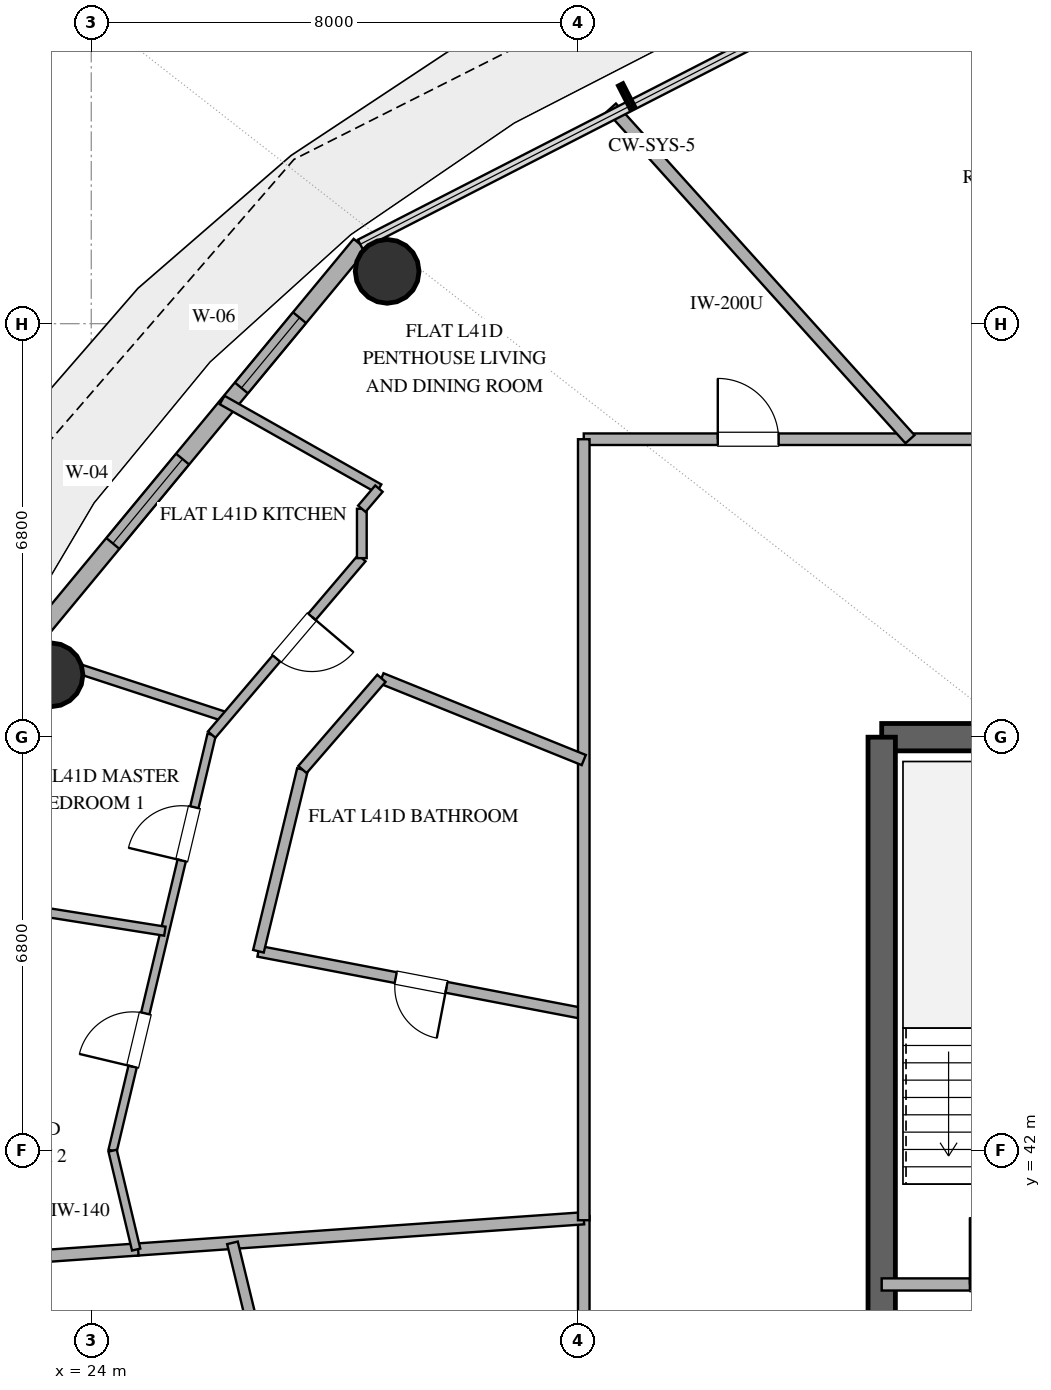
"""IFC4 building model, lengths in metres.
Left out: names, types, materials, properties, quantities, classifications, styles, units other than length and angle.
Written with IfcOpenShell. Run it as: python <this file> out.ifc"""

import sys

from ifc_helpers import new_model, si_unit, direction, frame, frame_2d, origin, origin_2d, place, context, subcontext, project, spatial, rectangle, hollow_circle, extrude, element, fill, save


model = new_model("IFC4")
c1 = context("Model", 3, precision=1e-05, world=origin(), true_north=direction((0.0, 1.0)))
c2 = subcontext(c1, "Body", "Model", "MODEL_VIEW")
j1 = project(units=[si_unit("LENGTHUNIT", "METRE"), si_unit("PLANEANGLEUNIT", "RADIAN")], contexts=[c1])
p1 = place(None, origin())
s1 = spatial("IfcSite", under=j1, at=p1, CompositionType="ELEMENT")
p2 = place(p1, origin())
s2 = spatial("IfcBuilding", under=s1, at=p2, CompositionType="ELEMENT")
p3 = place(p2, frame((0.0, 0.0, 165.0)))
s3 = spatial("IfcBuildingStorey", under=s2, at=p3, CompositionType="ELEMENT", Elevation=165.0)
p4 = place(p3, frame((37.0, 48.8, 0.0), z_axis=(0.0, 0.0, 1.0), x_axis=(1.0, 0.0, 0.0)))
e1 = element("IfcWall", 1, at=p4, inside=s3, PredefinedType="SHEAR", context=c2, shape_type="SweptSolid", body=[
    extrude(rectangle(XDim=4.0, YDim=0.45, at=frame_2d((2.0, 0.0))), origin(), (0.0, 0.0, 1.0), 3.38),
])
p5 = place(p3, frame((37.0, 35.2, 0.0), z_axis=(0.0, 0.0, 1.0), x_axis=(0.0, 1.0, 0.0)))
e2 = element("IfcWall", 2, at=p5, inside=s3, PredefinedType="SHEAR", context=c2, shape_type="SweptSolid", body=[
    extrude(rectangle(XDim=13.6, YDim=0.45, at=frame_2d((6.8, 0.0))), origin(), (0.0, 0.0, 1.0), 3.38),
])
for number, where, z_axis, x_axis in (
    (3, (28.866, 56.46, 0.0), (0.0, 0.0, 1.0), (1.0, 0.0, 0.0)),
    (4, (23.338, 49.826, 0.0), (0.0, 0.0, 1.0), (1.0, 0.0, 0.0)),
):
    element("IfcColumn", number, at=place(p3, frame(where, z_axis=z_axis, x_axis=x_axis)), inside=s3, PredefinedType="COLUMN", context=c2, shape_type="SweptSolid", body=[
        extrude(hollow_circle(Radius=0.525, WallThickness=0.028, at=origin_2d()), origin(), (0.0, 0.0, 1.0), 3.38),
    ])
p6 = place(p3, frame((28.424, 56.906, 0.0), z_axis=(0.0, 0.0, 1.0), x_axis=(-0.637333477683, -0.770588111915, 0.0)))
e5 = element("IfcWall", 5, at=p6, inside=s3, PredefinedType="SOLIDWALL", context=c2, shape_type="SweptSolid", body=[
    extrude(rectangle(XDim=8.875, YDim=0.28, at=frame_2d((4.438, 0.0))), origin(), (0.0, 0.0, 1.0), 3.38),
])
p7 = place(p6, frame((1.566, 0.0, 0.85)))
e6 = element("IfcOpeningElement", 6, at=p7, cuts=e5, PredefinedType="OPENING", context=c2, shape_type="SweptSolid", body=[
    extrude(rectangle(XDim=1.5, YDim=2.0, at=frame_2d((0.75, 1.0))), frame((0.0, 0.15, 0.0), z_axis=(0.0, -1.0, 0.0), x_axis=(1.0, 0.0, 0.0)), (0.0, 0.0, 1.0), 0.3),
])
p8 = place(p6, frame((4.584, 0.0, 0.85)))
e7 = element("IfcOpeningElement", 7, at=p8, cuts=e5, PredefinedType="OPENING", context=c2, shape_type="SweptSolid", body=[
    extrude(rectangle(XDim=1.8, YDim=2.2, at=frame_2d((0.9, 1.1))), frame((0.0, 0.15, 0.0), z_axis=(0.0, -1.0, 0.0), x_axis=(1.0, 0.0, 0.0)), (0.0, 0.0, 1.0), 0.3),
])
p9 = place(p3, frame((37.0, 39.8, 0.0), z_axis=(0.0, 0.0, 1.0), x_axis=(1.0, 0.0, 0.0)))
e8 = element("IfcWall", 8, at=p9, inside=s3, PredefinedType="SOLIDWALL", context=c2, shape_type="SweptSolid", body=[
    extrude(rectangle(XDim=4.0, YDim=0.2, at=frame_2d((2.0, 0.0))), origin(), (0.0, 0.0, 1.0), 2.74),
])
p10 = place(p9, frame((1.45, 0.0, 0.0)))
e9 = element("IfcOpeningElement", 9, at=p10, cuts=e8, PredefinedType="OPENING", context=c2, shape_type="SweptSolid", body=[
    extrude(rectangle(XDim=1.1, YDim=2.15, at=frame_2d((0.55, 1.075))), frame((0.0, 0.11, 0.0), z_axis=(0.0, -1.0, 0.0), x_axis=(1.0, 0.0, 0.0)), (0.0, 0.0, 1.0), 0.22),
])
p11 = place(p3, frame((32.1, 53.7, 0.0), z_axis=(0.0, 0.0, 1.0), x_axis=(1.0, 0.0, 0.0)))
e10 = element("IfcWall", 10, at=p11, inside=s3, PredefinedType="PARTITIONING", context=c2, shape_type="SweptSolid", body=[
    extrude(rectangle(XDim=19.477, YDim=0.19, at=frame_2d((9.738, 0.0))), origin(), (0.0, 0.0, 1.0), 2.74),
])
p12 = place(p11, frame((9.923, 0.0, 0.0)))
e11 = element("IfcOpeningElement", 11, at=p12, cuts=e10, PredefinedType="OPENING", context=c2, shape_type="SweptSolid", body=[
    extrude(rectangle(XDim=1.0, YDim=2.2, at=frame_2d((0.5, 1.1))), frame((0.0, 0.105, 0.0), z_axis=(0.0, -1.0, 0.0), x_axis=(1.0, 0.0, 0.0)), (0.0, 0.0, 1.0), 0.21),
])
p13 = place(p11, frame((2.204, 0.0, 0.0)))
e12 = element("IfcOpeningElement", 12, at=p13, cuts=e10, PredefinedType="OPENING", context=c2, shape_type="SweptSolid", body=[
    extrude(rectangle(XDim=1.0, YDim=2.2, at=frame_2d((0.5, 1.1))), frame((0.0, 0.105, 0.0), z_axis=(0.0, -1.0, 0.0), x_axis=(1.0, 0.0, 0.0)), (0.0, 0.0, 1.0), 0.21),
])
p14 = place(p3, frame((32.1, 30.3, 0.0), z_axis=(0.0, 0.0, 1.0), x_axis=(0.0, 1.0, 0.0)))
e13 = element("IfcWall", 13, at=p14, inside=s3, PredefinedType="PARTITIONING", context=c2, shape_type="SweptSolid", body=[
    extrude(rectangle(XDim=10.62, YDim=0.19, at=frame_2d((5.31, 0.0))), origin(), (0.0, 0.0, 1.0), 2.74),
])
p15 = place(p14, frame((3.475, 0.0, 0.0)))
e14 = element("IfcOpeningElement", 14, at=p15, cuts=e13, PredefinedType="OPENING", context=c2, shape_type="SweptSolid", body=[
    extrude(rectangle(XDim=1.0, YDim=2.2, at=frame_2d((0.5, 1.1))), frame((0.0, 0.105, 0.0), z_axis=(0.0, -1.0, 0.0), x_axis=(1.0, 0.0, 0.0)), (0.0, 0.0, 1.0), 0.21),
])
p16 = place(p3, frame((37.465, 53.7, 0.0), z_axis=(0.0, 0.0, 1.0), x_axis=(-0.669128292476, 0.7431469089, 0.0)))
e15 = element("IfcWall", 15, at=p16, inside=s3, PredefinedType="PARTITIONING", context=c2, shape_type="SweptSolid", body=[
    extrude(rectangle(XDim=7.339, YDim=0.2, at=frame_2d((3.669, 0.0))), origin(), (0.0, 0.0, 1.0), 2.74),
])
p17 = place(p3, frame((32.1, 40.888, 0.0), z_axis=(0.0, 0.0, 1.0), x_axis=(-0.997562906323, -0.069772830877, 0.0)))
e16 = element("IfcWall", 16, at=p17, inside=s3, PredefinedType="PARTITIONING", context=c2, shape_type="SweptSolid", body=[
    extrude(rectangle(XDim=7.38, YDim=0.2, at=frame_2d((3.69, 0.0))), origin(), (0.0, 0.0, 1.0), 2.74),
])
p18 = place(p3, frame((32.1, 44.253, 0.0), z_axis=(0.0, 0.0, 1.0), x_axis=(-0.982102846986, 0.188345421878, 0.0)))
e17 = element("IfcWall", 17, at=p18, inside=s3, PredefinedType="PLUMBINGWALL", context=c2, shape_type="SweptSolid", body=[
    extrude(rectangle(XDim=5.448, YDim=0.18, at=frame_2d((2.724, 0.0))), origin(), (0.0, 0.0, 1.0), 2.74),
])
p19 = place(p18, frame((2.299, 0.0, 0.0)))
e18 = element("IfcOpeningElement", 18, at=p19, cuts=e17, PredefinedType="OPENING", context=c2, shape_type="SweptSolid", body=[
    extrude(rectangle(XDim=0.85, YDim=2.1, at=frame_2d((0.425, 1.05))), frame((0.0, 0.1, 0.0), z_axis=(0.0, -1.0, 0.0), x_axis=(1.0, 0.0, 0.0)), (0.0, 0.0, 1.0), 0.2),
])
p20 = place(p3, frame((32.1, 40.856, 0.0), z_axis=(0.0, 0.0, 1.0), x_axis=(0.0, 1.0, 0.0)))
e19 = element("IfcWall", 19, at=p20, inside=s3, PredefinedType="PARTITIONING", context=c2, shape_type="SweptSolid", body=[
    extrude(rectangle(XDim=12.844, YDim=0.19, at=frame_2d((6.422, 0.0))), origin(), (0.0, 0.0, 1.0), 2.74),
])
p21 = place(p3, frame((26.322, 40.484, 0.0), z_axis=(0.0, 0.0, 1.0), x_axis=(0.235484788327, -0.971878034769, 0.0)))
e20 = element("IfcWall", 20, at=p21, inside=s3, PredefinedType="PLUMBINGWALL", context=c2, shape_type="SweptSolid", body=[
    extrude(rectangle(XDim=4.73, YDim=0.18, at=frame_2d((2.365, 0.0))), origin(), (0.0, 0.0, 1.0), 2.74),
])
p22 = place(p3, frame((24.351, 42.0, 0.0), z_axis=(0.0, 0.0, 1.0), x_axis=(0.231625219966, 0.972805097373, 0.0)))
e21 = element("IfcWall", 21, at=p22, inside=s3, PredefinedType="PARTITIONING", context=c2, shape_type="SweptSolid", body=[
    extrude(rectangle(XDim=7.033, YDim=0.14, at=frame_2d((3.517, 0.0))), origin(), (0.0, 0.0, 1.0), 2.74),
])
p23 = place(p22, frame((1.421, 0.0, 0.0)))
e22 = element("IfcOpeningElement", 22, at=p23, cuts=e21, PredefinedType="OPENING", context=c2, shape_type="SweptSolid", body=[
    extrude(rectangle(XDim=0.9, YDim=2.1, at=frame_2d((0.45, 1.05))), frame((0.0, 0.08, 0.0), z_axis=(0.0, -1.0, 0.0), x_axis=(1.0, 0.0, 0.0)), (0.0, 0.0, 1.0), 0.16),
])
p24 = place(p22, frame((4.906, 0.0, 0.0)))
e23 = element("IfcOpeningElement", 23, at=p24, cuts=e21, PredefinedType="OPENING", context=c2, shape_type="SweptSolid", body=[
    extrude(rectangle(XDim=0.9, YDim=2.1, at=frame_2d((0.45, 1.05))), frame((0.0, 0.08, 0.0), z_axis=(0.0, -1.0, 0.0), x_axis=(1.0, 0.0, 0.0)), (0.0, 0.0, 1.0), 0.16),
])
p25 = place(p3, frame((22.78, 50.257, 0.0), z_axis=(0.0, 0.0, 1.0), x_axis=(0.95036707557, -0.311130875474, 0.0)))
e24 = element("IfcWall", 24, at=p25, inside=s3, PredefinedType="PLUMBINGWALL", context=c2, shape_type="SweptSolid", body=[
    extrude(rectangle(XDim=3.625, YDim=0.16, at=frame_2d((1.812, 0.0))), origin(), (0.0, 0.0, 1.0), 2.74),
])
p26 = place(p3, frame((28.773, 49.768, 0.0), z_axis=(0.0, 0.0, 1.0), x_axis=(0.927195040954, -0.374578904945, 0.0)))
e25 = element("IfcWall", 25, at=p26, inside=s3, PredefinedType="PLUMBINGWALL", context=c2, shape_type="SweptSolid", body=[
    extrude(rectangle(XDim=3.589, YDim=0.18, at=frame_2d((1.794, 0.0))), origin(), (0.0, 0.0, 1.0), 2.74),
])
p27 = place(p3, frame((21.212, 40.127, 0.0), z_axis=(0.0, 0.0, 1.0), x_axis=(0.997565256009, 0.069739228586, 0.0)))
e26 = element("IfcWall", 26, at=p27, inside=s3, PredefinedType="PARTITIONING", context=c2, shape_type="SweptSolid", body=[
    extrude(rectangle(XDim=3.567, YDim=0.2, at=frame_2d((1.784, 0.0))), origin(), (0.0, 0.0, 1.0), 2.74),
])
p28 = place(p3, frame((25.211, 45.61, 0.0), z_axis=(0.0, 0.0, 1.0), x_axis=(-0.987691308322, 0.156415726399, 0.0)))
e27 = element("IfcWall", 27, at=p28, inside=s3, PredefinedType="PARTITIONING", context=c2, shape_type="SweptSolid", body=[
    extrude(rectangle(XDim=3.513, YDim=0.15, at=frame_2d((1.757, 0.0))), origin(), (0.0, 0.0, 1.0), 2.74),
])
p29 = place(p3, frame((28.45, 51.744, 0.0), z_axis=(0.0, 0.0, 1.0), x_axis=(-0.648022171798, -0.761621470849, 0.0)))
e28 = element("IfcWall", 28, at=p29, inside=s3, PredefinedType="PLUMBINGWALL", context=c2, shape_type="SweptSolid", body=[
    extrude(rectangle(XDim=3.81, YDim=0.16, at=frame_2d((1.905, 0.0))), origin(), (0.0, 0.0, 1.0), 2.74),
])
p30 = place(p29, frame((1.267, 0.0, 0.0)))
e29 = element("IfcOpeningElement", 29, at=p30, cuts=e28, PredefinedType="OPENING", context=c2, shape_type="SweptSolid", body=[
    extrude(rectangle(XDim=0.9, YDim=2.1, at=frame_2d((0.45, 1.05))), frame((0.0, 0.09, 0.0), z_axis=(0.0, -1.0, 0.0), x_axis=(1.0, 0.0, 0.0)), (0.0, 0.0, 1.0), 0.18),
])
p31 = place(p3, frame((26.75, 45.279, 0.0), z_axis=(0.0, 0.0, 1.0), x_axis=(0.235525049635, 0.971868278624, 0.0)))
e30 = element("IfcWall", 30, at=p31, inside=s3, PredefinedType="PLUMBINGWALL", context=c2, shape_type="SweptSolid", body=[
    extrude(rectangle(XDim=3.075, YDim=0.18, at=frame_2d((1.538, 0.0))), origin(), (0.0, 0.0, 1.0), 2.74),
])
p32 = place(p3, frame((26.152, 54.345, 0.0), z_axis=(0.0, 0.0, 1.0), x_axis=(0.870631902874, -0.491935046219, 0.0)))
e31 = element("IfcWall", 31, at=p32, inside=s3, PredefinedType="PLUMBINGWALL", context=c2, shape_type="SweptSolid", body=[
    extrude(rectangle(XDim=2.962, YDim=0.16, at=frame_2d((1.481, 0.0))), origin(), (0.0, 0.0, 1.0), 2.74),
])
p33 = place(p3, frame((27.474, 48.268, 0.0), z_axis=(0.0, 0.0, 1.0), x_axis=(0.654593195673, 0.755981314702, 0.0)))
e32 = element("IfcWall", 32, at=p33, inside=s3, PredefinedType="PLUMBINGWALL", context=c2, shape_type="SweptSolid", body=[
    extrude(rectangle(XDim=1.984, YDim=0.18, at=frame_2d((0.992, 0.0))), origin(), (0.0, 0.0, 1.0), 2.74),
])
p34 = place(p3, frame((24.739, 40.373, 0.0), z_axis=(0.0, 0.0, 1.0), x_axis=(-0.231561310927, 0.972820311919, 0.0)))
e33 = element("IfcWall", 33, at=p34, inside=s3, PredefinedType="PARTITIONING", context=c2, shape_type="SweptSolid", body=[
    extrude(rectangle(XDim=1.672, YDim=0.14, at=frame_2d((0.836, 0.0))), origin(), (0.0, 0.0, 1.0), 2.74),
])
p35 = place(p3, frame((28.45, 52.557, 0.0), z_axis=(0.0, 0.0, 1.0), x_axis=(0.0, -1.0, 0.0)))
e34 = element("IfcWall", 34, at=p35, inside=s3, PredefinedType="PLUMBINGWALL", context=c2, shape_type="SweptSolid", body=[
    extrude(rectangle(XDim=0.812, YDim=0.16, at=frame_2d((0.406, 0.0))), origin(), (0.0, 0.0, 1.0), 2.74),
])
p36 = place(p3, frame((28.731, 52.887, 0.0), z_axis=(0.0, 0.0, 1.0), x_axis=(-0.648056208932, -0.761592509196, 0.0)))
e35 = element("IfcWall", 35, at=p36, inside=s3, PredefinedType="PLUMBINGWALL", context=c2, shape_type="SweptSolid", body=[
    extrude(rectangle(XDim=0.434, YDim=0.16, at=frame_2d((0.217, 0.0))), origin(), (0.0, 0.0, 1.0), 2.74),
])
p37 = place(p7, origin())
e36 = element("IfcWindow", 36, at=p37, inside=s3, PartitioningType="SINGLE_PANEL", PredefinedType="WINDOW", context=c2, shape_type="SweptSolid", body=[
    extrude(rectangle(XDim=1.5, YDim=2.0, at=frame_2d((0.75, 1.0))), frame((0.0, 0.03, 0.0), z_axis=(0.0, -1.0, 0.0), x_axis=(1.0, 0.0, 0.0)), (0.0, 0.0, 1.0), 0.06),
])
fill(e6, e36)
p38 = place(p8, origin())
e37 = element("IfcWindow", 37, at=p38, inside=s3, PartitioningType="SINGLE_PANEL", PredefinedType="WINDOW", context=c2, shape_type="SweptSolid", body=[
    extrude(rectangle(XDim=1.8, YDim=2.2, at=frame_2d((0.9, 1.1))), frame((0.0, 0.03, 0.0), z_axis=(0.0, -1.0, 0.0), x_axis=(1.0, 0.0, 0.0)), (0.0, 0.0, 1.0), 0.06),
])
fill(e7, e37)
p39 = place(p10, origin())
e38 = element("IfcDoor", 38, at=p39, inside=s3, OperationType="SINGLE_SWING_LEFT", PredefinedType="DOOR", context=c2, shape_type="SweptSolid", body=[
    extrude(rectangle(XDim=1.1, YDim=2.15, at=frame_2d((0.55, 1.075))), frame((0.0, 0.025, 0.0), z_axis=(0.0, -1.0, 0.0), x_axis=(1.0, 0.0, 0.0)), (0.0, 0.0, 1.0), 0.05),
])
fill(e9, e38)
p40 = place(p13, origin())
e39 = element("IfcDoor", 39, at=p40, inside=s3, OperationType="SINGLE_SWING_LEFT", PredefinedType="DOOR", context=c2, shape_type="SweptSolid", body=[
    extrude(rectangle(XDim=1.0, YDim=2.2, at=frame_2d((0.5, 1.1))), frame((0.0, 0.025, 0.0), z_axis=(0.0, -1.0, 0.0), x_axis=(1.0, 0.0, 0.0)), (0.0, 0.0, 1.0), 0.05),
])
fill(e12, e39)
p41 = place(p19, origin())
e40 = element("IfcDoor", 40, at=p41, inside=s3, OperationType="SINGLE_SWING_LEFT", PredefinedType="DOOR", context=c2, shape_type="SweptSolid", body=[
    extrude(rectangle(XDim=0.85, YDim=2.1, at=frame_2d((0.425, 1.05))), frame((0.0, 0.025, 0.0), z_axis=(0.0, -1.0, 0.0), x_axis=(1.0, 0.0, 0.0)), (0.0, 0.0, 1.0), 0.05),
])
fill(e18, e40)
p42 = place(p23, origin())
e41 = element("IfcDoor", 41, at=p42, inside=s3, OperationType="SINGLE_SWING_LEFT", PredefinedType="DOOR", context=c2, shape_type="SweptSolid", body=[
    extrude(rectangle(XDim=0.9, YDim=2.1, at=frame_2d((0.45, 1.05))), frame((0.0, 0.025, 0.0), z_axis=(0.0, -1.0, 0.0), x_axis=(1.0, 0.0, 0.0)), (0.0, 0.0, 1.0), 0.05),
])
fill(e22, e41)
p43 = place(p24, origin())
e42 = element("IfcDoor", 42, at=p43, inside=s3, OperationType="SINGLE_SWING_LEFT", PredefinedType="DOOR", context=c2, shape_type="SweptSolid", body=[
    extrude(rectangle(XDim=0.9, YDim=2.1, at=frame_2d((0.45, 1.05))), frame((0.0, 0.025, 0.0), z_axis=(0.0, -1.0, 0.0), x_axis=(1.0, 0.0, 0.0)), (0.0, 0.0, 1.0), 0.05),
])
fill(e23, e42)
p44 = place(p30, origin())
e43 = element("IfcDoor", 43, at=p44, inside=s3, OperationType="SINGLE_SWING_LEFT", PredefinedType="DOOR", context=c2, shape_type="SweptSolid", body=[
    extrude(rectangle(XDim=0.9, YDim=2.1, at=frame_2d((0.45, 1.05))), frame((0.0, 0.025, 0.0), z_axis=(0.0, -1.0, 0.0), x_axis=(1.0, 0.0, 0.0)), (0.0, 0.0, 1.0), 0.05),
])
fill(e29, e43)
save(model, sys.argv[1])
